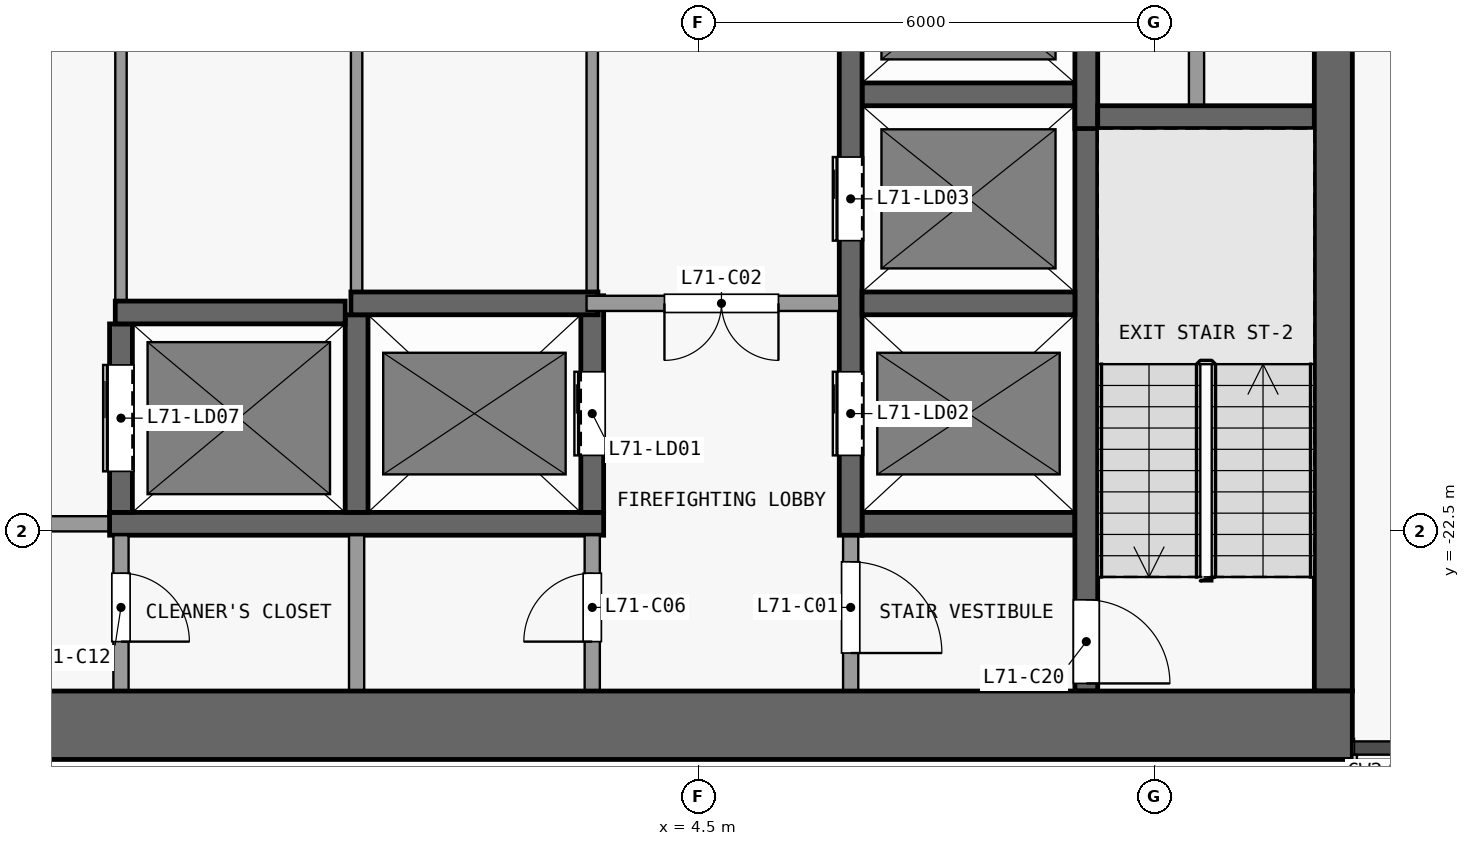
"""IFC4 building model, lengths in metres.
Left out: names, types, materials, properties, quantities, classifications, styles, units other than length and angle.
Written with IfcOpenShell. Run it as: python <this file> out.ifc"""

import sys

from ifc_helpers import new_model, si_unit, direction, frame, frame_2d, origin, place, context, subcontext, project, spatial, rectangle, extrude, element, fill, save


model = new_model("IFC4")
c1 = context("Model", 3, precision=1e-05, world=origin(), true_north=direction((0.0, 1.0)))
c2 = subcontext(c1, "Body", "Model", "MODEL_VIEW")
j1 = project(units=[si_unit("LENGTHUNIT", "METRE"), si_unit("PLANEANGLEUNIT", "RADIAN")], contexts=[c1])
p1 = place(None, origin())
s1 = spatial("IfcSite", under=j1, at=p1, CompositionType="ELEMENT")
p2 = place(p1, origin())
s2 = spatial("IfcBuilding", under=s1, at=p2, CompositionType="ELEMENT")
p3 = place(p2, frame((0.0, 0.0, 280.7)))
s3 = spatial("IfcBuildingStorey", under=s2, at=p3, CompositionType="ELEMENT", Elevation=280.7)
p4 = place(p3, frame((-13.1, -25.05, 0.0), z_axis=(0.0, 0.0, 1.0), x_axis=(1.0, 0.0, 0.0)))
e1 = element("IfcWall", 1, at=p4, inside=s3, PredefinedType="SHEAR", context=c2, shape_type="SweptSolid", body=[
    extrude(rectangle(XDim=26.2, YDim=0.9, at=frame_2d((13.1, 0.0))), origin(), (0.0, 0.0, 1.0), 3.3),
])
p5 = place(p3, frame((12.85, -24.6, 0.0), z_axis=(0.0, 0.0, 1.0), x_axis=(0.0, 1.0, 0.0)))
e2 = element("IfcWall", 2, at=p5, inside=s3, PredefinedType="SHEAR", context=c2, shape_type="SweptSolid", body=[
    extrude(rectangle(XDim=16.1, YDim=0.5, at=frame_2d((8.05, 0.0))), origin(), (0.0, 0.0, 1.0), 3.3),
])
p6 = place(p3, frame((-3.25, -22.4, 0.0), z_axis=(0.0, 0.0, 1.0), x_axis=(-1.0, 0.0, 0.0)))
e3 = element("IfcWall", 3, at=p6, inside=s3, PredefinedType="PARTITIONING", context=c2, shape_type="SweptSolid", body=[
    extrude(rectangle(XDim=6.2, YDim=0.2, at=frame_2d((3.1, 0.0))), origin(), (0.0, 0.0, 1.0), 3.3),
])
p7 = place(p6, frame((0.8, 0.0, 0.0)))
e4 = element("IfcOpeningElement", 4, at=p7, cuts=e3, PredefinedType="OPENING", context=c2, shape_type="SweptSolid", body=[
    extrude(rectangle(XDim=1.5, YDim=2.1, at=frame_2d((0.75, 1.05))), frame((0.0, 0.11, 0.0), z_axis=(0.0, -1.0, 0.0), x_axis=(1.0, 0.0, 0.0)), (0.0, 0.0, 1.0), 0.22),
])
p8 = place(p3, frame((-3.25, -22.4, 0.0), z_axis=(0.0, 0.0, 1.0), x_axis=(1.0, 0.0, 0.0)))
e5 = element("IfcWall", 5, at=p8, inside=s3, PredefinedType="SHEAR", context=c2, shape_type="SweptSolid", body=[
    extrude(rectangle(XDim=6.5, YDim=0.3, at=frame_2d((3.25, 0.0))), origin(), (0.0, 0.0, 1.0), 3.3),
])
p9 = place(p3, frame((6.65, -22.4, 0.0), z_axis=(0.0, 0.0, 1.0), x_axis=(1.0, 0.0, 0.0)))
e6 = element("IfcWall", 6, at=p9, inside=s3, PredefinedType="SHEAR", context=c2, shape_type="SweptSolid", body=[
    extrude(rectangle(XDim=2.8, YDim=0.3, at=frame_2d((1.4, 0.0))), origin(), (0.0, 0.0, 1.0), 3.3),
])
p10 = place(p3, frame((-3.175, -19.62, 0.0), z_axis=(0.0, 0.0, 1.0), x_axis=(1.0, 0.0, 0.0)))
e7 = element("IfcWall", 7, at=p10, inside=s3, PredefinedType="SHEAR", context=c2, shape_type="SweptSolid", body=[
    extrude(rectangle(XDim=3.025, YDim=0.3, at=frame_2d((1.513, 0.0))), origin(), (0.0, 0.0, 1.0), 3.3),
])
p11 = place(p3, frame((-0.075, -19.5, 0.0), z_axis=(0.0, 0.0, 1.0), x_axis=(1.0, 0.0, 0.0)))
e8 = element("IfcWall", 8, at=p11, inside=s3, PredefinedType="SHEAR", context=c2, shape_type="SweptSolid", body=[
    extrude(rectangle(XDim=3.25, YDim=0.3, at=frame_2d((1.625, 0.0))), origin(), (0.0, 0.0, 1.0), 3.3),
])
p12 = place(p3, frame((6.35, -19.5, 0.0), z_axis=(0.0, 0.0, 1.0), x_axis=(-1.0, 0.0, 0.0)))
e9 = element("IfcWall", 9, at=p12, inside=s3, PredefinedType="PARTITIONING", context=c2, shape_type="SweptSolid", body=[
    extrude(rectangle(XDim=3.325, YDim=0.2, at=frame_2d((1.663, 0.0))), origin(), (0.0, 0.0, 1.0), 3.3),
])
p13 = place(p12, frame((0.8, 0.0, 0.0)))
e10 = element("IfcOpeningElement", 10, at=p13, cuts=e9, PredefinedType="OPENING", context=c2, shape_type="SweptSolid", body=[
    extrude(rectangle(XDim=1.5, YDim=2.1, at=frame_2d((0.75, 1.05))), frame((0.0, 0.11, 0.0), z_axis=(0.0, -1.0, 0.0), x_axis=(1.0, 0.0, 0.0)), (0.0, 0.0, 1.0), 0.22),
])
p14 = place(p3, frame((6.65, -19.5, 0.0), z_axis=(0.0, 0.0, 1.0), x_axis=(1.0, 0.0, 0.0)))
e11 = element("IfcWall", 11, at=p14, inside=s3, PredefinedType="SHEAR", context=c2, shape_type="SweptSolid", body=[
    extrude(rectangle(XDim=2.8, YDim=0.3, at=frame_2d((1.4, 0.0))), origin(), (0.0, 0.0, 1.0), 3.3),
])
p15 = place(p3, frame((9.75, -17.05, 0.0), z_axis=(0.0, 0.0, 1.0), x_axis=(1.0, 0.0, 0.0)))
e12 = element("IfcWall", 12, at=p15, inside=s3, PredefinedType="SHEAR", context=c2, shape_type="SweptSolid", body=[
    extrude(rectangle(XDim=2.85, YDim=0.3, at=frame_2d((1.425, 0.0))), origin(), (0.0, 0.0, 1.0), 3.3),
])
p16 = place(p3, frame((6.65, -16.75, 0.0), z_axis=(0.0, 0.0, 1.0), x_axis=(1.0, 0.0, 0.0)))
e13 = element("IfcWall", 13, at=p16, inside=s3, PredefinedType="SHEAR", context=c2, shape_type="SweptSolid", body=[
    extrude(rectangle(XDim=2.8, YDim=0.3, at=frame_2d((1.4, 0.0))), origin(), (0.0, 0.0, 1.0), 3.3),
])
p17 = place(p3, frame((-3.1, -22.55, 0.0), z_axis=(0.0, 0.0, 1.0), x_axis=(0.0, -1.0, 0.0)))
e14 = element("IfcWall", 14, at=p17, inside=s3, PredefinedType="PARTITIONING", context=c2, shape_type="SweptSolid", body=[
    extrude(rectangle(XDim=2.05, YDim=0.2, at=frame_2d((1.025, 0.0))), origin(), (0.0, 0.0, 1.0), 3.3),
])
p18 = place(p17, frame((0.5, 0.0, 0.0)))
e15 = element("IfcOpeningElement", 15, at=p18, cuts=e14, PredefinedType="OPENING", context=c2, shape_type="SweptSolid", body=[
    extrude(rectangle(XDim=0.9, YDim=2.1, at=frame_2d((0.45, 1.05))), frame((0.0, 0.11, 0.0), z_axis=(0.0, -1.0, 0.0), x_axis=(1.0, 0.0, 0.0)), (0.0, 0.0, 1.0), 0.22),
])
p19 = place(p3, frame((-3.1, -22.25, 0.0), z_axis=(0.0, 0.0, 1.0), x_axis=(0.0, 1.0, 0.0)))
e16 = element("IfcWall", 16, at=p19, inside=s3, PredefinedType="SHEAR", context=c2, shape_type="SweptSolid", body=[
    extrude(rectangle(XDim=2.48, YDim=0.3, at=frame_2d((1.24, 0.0))), origin(), (0.0, 0.0, 1.0), 3.3),
])
p20 = place(p19, frame((0.54, 0.0, 0.0)))
e17 = element("IfcOpeningElement", 17, at=p20, cuts=e16, PredefinedType="OPENING", context=c2, shape_type="SweptSolid", body=[
    extrude(rectangle(XDim=1.4, YDim=2.1, at=frame_2d((0.7, 1.05))), frame((0.0, 0.16, 0.0), z_axis=(0.0, -1.0, 0.0), x_axis=(1.0, 0.0, 0.0)), (0.0, 0.0, 1.0), 0.32),
])
p21 = place(p3, frame((-3.1, -8.5, 0.0), z_axis=(0.0, 0.0, 1.0), x_axis=(0.0, -1.0, 0.0)))
e18 = element("IfcWall", 18, at=p21, inside=s3, PredefinedType="PARTITIONING", context=c2, shape_type="SweptSolid", body=[
    extrude(rectangle(XDim=10.97, YDim=0.15, at=frame_2d((5.485, 0.0))), origin(), (0.0, 0.0, 1.0), 3.3),
])
p22 = place(p21, frame((4.96, 0.0, 0.0)))
e19 = element("IfcOpeningElement", 19, at=p22, cuts=e18, PredefinedType="OPENING", context=c2, shape_type="SweptSolid", body=[
    extrude(rectangle(XDim=1.2, YDim=2.1, at=frame_2d((0.6, 1.05))), frame((0.0, 0.085, 0.0), z_axis=(0.0, -1.0, 0.0), x_axis=(1.0, 0.0, 0.0)), (0.0, 0.0, 1.0), 0.17),
])
p23 = place(p3, frame((0.0, -24.6, 0.0), z_axis=(0.0, 0.0, 1.0), x_axis=(0.0, 1.0, 0.0)))
e20 = element("IfcWall", 20, at=p23, inside=s3, PredefinedType="PARTITIONING", context=c2, shape_type="SweptSolid", body=[
    extrude(rectangle(XDim=2.05, YDim=0.2, at=frame_2d((1.025, 0.0))), origin(), (0.0, 0.0, 1.0), 3.3),
])
p24 = place(p3, frame((0.0, -22.25, 0.0), z_axis=(0.0, 0.0, 1.0), x_axis=(0.0, 1.0, 0.0)))
e21 = element("IfcWall", 21, at=p24, inside=s3, PredefinedType="SHEAR", context=c2, shape_type="SweptSolid", body=[
    extrude(rectangle(XDim=2.6, YDim=0.3, at=frame_2d((1.3, 0.0))), origin(), (0.0, 0.0, 1.0), 3.3),
])
p25 = place(p3, frame((0.0, -19.35, 0.0), z_axis=(0.0, 0.0, 1.0), x_axis=(0.0, 1.0, 0.0)))
e22 = element("IfcWall", 22, at=p25, inside=s3, PredefinedType="PARTITIONING", context=c2, shape_type="SweptSolid", body=[
    extrude(rectangle(XDim=10.85, YDim=0.15, at=frame_2d((5.425, 0.0))), origin(), (0.0, 0.0, 1.0), 3.3),
])
p26 = place(p3, frame((3.1, -24.6, 0.0), z_axis=(0.0, 0.0, 1.0), x_axis=(0.0, 1.0, 0.0)))
e23 = element("IfcWall", 23, at=p26, inside=s3, PredefinedType="PARTITIONING", context=c2, shape_type="SweptSolid", body=[
    extrude(rectangle(XDim=2.05, YDim=0.2, at=frame_2d((1.025, 0.0))), origin(), (0.0, 0.0, 1.0), 3.3),
])
p27 = place(p26, frame((0.65, 0.0, 0.0)))
e24 = element("IfcOpeningElement", 24, at=p27, cuts=e23, PredefinedType="OPENING", context=c2, shape_type="SweptSolid", body=[
    extrude(rectangle(XDim=0.9, YDim=2.1, at=frame_2d((0.45, 1.05))), frame((0.0, 0.11, 0.0), z_axis=(0.0, -1.0, 0.0), x_axis=(1.0, 0.0, 0.0)), (0.0, 0.0, 1.0), 0.22),
])
p28 = place(p3, frame((3.1, -22.25, 0.0), z_axis=(0.0, 0.0, 1.0), x_axis=(0.0, 1.0, 0.0)))
e25 = element("IfcWall", 25, at=p28, inside=s3, PredefinedType="SHEAR", context=c2, shape_type="SweptSolid", body=[
    extrude(rectangle(XDim=2.85, YDim=0.3, at=frame_2d((1.425, 0.0))), origin(), (0.0, 0.0, 1.0), 3.3),
])
p29 = place(p28, frame((0.75, 0.0, 0.0)))
e26 = element("IfcOpeningElement", 26, at=p29, cuts=e25, PredefinedType="OPENING", context=c2, shape_type="SweptSolid", body=[
    extrude(rectangle(XDim=1.1, YDim=2.1, at=frame_2d((0.55, 1.05))), frame((0.0, 0.16, 0.0), z_axis=(0.0, -1.0, 0.0), x_axis=(1.0, 0.0, 0.0)), (0.0, 0.0, 1.0), 0.32),
])
p30 = place(p3, frame((3.1, -19.4, 0.0), z_axis=(0.0, 0.0, 1.0), x_axis=(0.0, 1.0, 0.0)))
e27 = element("IfcWall", 27, at=p30, inside=s3, PredefinedType="PARTITIONING", context=c2, shape_type="SweptSolid", body=[
    extrude(rectangle(XDim=10.9, YDim=0.15, at=frame_2d((5.45, 0.0))), origin(), (0.0, 0.0, 1.0), 3.3),
])
p31 = place(p30, frame((4.8, 0.0, 0.0)))
e28 = element("IfcOpeningElement", 28, at=p31, cuts=e27, PredefinedType="OPENING", context=c2, shape_type="SweptSolid", body=[
    extrude(rectangle(XDim=1.2, YDim=2.1, at=frame_2d((0.6, 1.05))), frame((0.0, 0.085, 0.0), z_axis=(0.0, -1.0, 0.0), x_axis=(1.0, 0.0, 0.0)), (0.0, 0.0, 1.0), 0.17),
])
p32 = place(p3, frame((6.5, -22.55, 0.0), z_axis=(0.0, 0.0, 1.0), x_axis=(0.0, -1.0, 0.0)))
e29 = element("IfcWall", 29, at=p32, inside=s3, PredefinedType="PARTITIONING", context=c2, shape_type="SweptSolid", body=[
    extrude(rectangle(XDim=2.05, YDim=0.2, at=frame_2d((1.025, 0.0))), origin(), (0.0, 0.0, 1.0), 3.3),
])
p33 = place(p32, frame((0.35, 0.0, 0.0)))
e30 = element("IfcOpeningElement", 30, at=p33, cuts=e29, PredefinedType="OPENING", context=c2, shape_type="SweptSolid", body=[
    extrude(rectangle(XDim=1.2, YDim=2.1, at=frame_2d((0.6, 1.05))), frame((0.0, 0.11, 0.0), z_axis=(0.0, -1.0, 0.0), x_axis=(1.0, 0.0, 0.0)), (0.0, 0.0, 1.0), 0.22),
])
p34 = place(p3, frame((6.5, -22.55, 0.0), z_axis=(0.0, 0.0, 1.0), x_axis=(0.0, 1.0, 0.0)))
e31 = element("IfcWall", 31, at=p34, inside=s3, PredefinedType="SHEAR", context=c2, shape_type="SweptSolid", body=[
    extrude(rectangle(XDim=14.05, YDim=0.3, at=frame_2d((7.025, 0.0))), origin(), (0.0, 0.0, 1.0), 3.3),
])
p35 = place(p34, frame((1.05, 0.0, 0.0)))
e32 = element("IfcOpeningElement", 32, at=p35, cuts=e31, PredefinedType="OPENING", context=c2, shape_type="SweptSolid", body=[
    extrude(rectangle(XDim=1.1, YDim=2.1, at=frame_2d((0.55, 1.05))), frame((0.0, 0.16, 0.0), z_axis=(0.0, -1.0, 0.0), x_axis=(1.0, 0.0, 0.0)), (0.0, 0.0, 1.0), 0.32),
])
p36 = place(p34, frame((3.875, 0.0, 0.0)))
e33 = element("IfcOpeningElement", 33, at=p36, cuts=e31, PredefinedType="OPENING", context=c2, shape_type="SweptSolid", body=[
    extrude(rectangle(XDim=1.1, YDim=2.1, at=frame_2d((0.55, 1.05))), frame((0.0, 0.16, 0.0), z_axis=(0.0, -1.0, 0.0), x_axis=(1.0, 0.0, 0.0)), (0.0, 0.0, 1.0), 0.32),
])
p37 = place(p34, frame((6.625, 0.0, 0.0)))
e34 = element("IfcOpeningElement", 34, at=p37, cuts=e31, PredefinedType="OPENING", context=c2, shape_type="SweptSolid", body=[
    extrude(rectangle(XDim=1.1, YDim=2.1, at=frame_2d((0.55, 1.05))), frame((0.0, 0.16, 0.0), z_axis=(0.0, -1.0, 0.0), x_axis=(1.0, 0.0, 0.0)), (0.0, 0.0, 1.0), 0.32),
])
p38 = place(p34, frame((9.375, 0.0, 0.0)))
e35 = element("IfcOpeningElement", 35, at=p38, cuts=e31, PredefinedType="OPENING", context=c2, shape_type="SweptSolid", body=[
    extrude(rectangle(XDim=1.1, YDim=2.1, at=frame_2d((0.55, 1.05))), frame((0.0, 0.16, 0.0), z_axis=(0.0, -1.0, 0.0), x_axis=(1.0, 0.0, 0.0)), (0.0, 0.0, 1.0), 0.32),
])
p39 = place(p34, frame((12.125, 0.0, 0.0)))
e36 = element("IfcOpeningElement", 36, at=p39, cuts=e31, PredefinedType="OPENING", context=c2, shape_type="SweptSolid", body=[
    extrude(rectangle(XDim=1.1, YDim=2.1, at=frame_2d((0.55, 1.05))), frame((0.0, 0.16, 0.0), z_axis=(0.0, -1.0, 0.0), x_axis=(1.0, 0.0, 0.0)), (0.0, 0.0, 1.0), 0.32),
])
p40 = place(p3, frame((9.6, -16.9, 0.0), z_axis=(0.0, 0.0, 1.0), x_axis=(0.0, -1.0, 0.0)))
e37 = element("IfcWall", 37, at=p40, inside=s3, PredefinedType="SHEAR", context=c2, shape_type="SweptSolid", body=[
    extrude(rectangle(XDim=7.7, YDim=0.3, at=frame_2d((3.85, 0.0))), origin(), (0.0, 0.0, 1.0), 3.3),
])
p41 = place(p40, frame((6.5, 0.0, 0.0)))
e38 = element("IfcOpeningElement", 38, at=p41, cuts=e37, PredefinedType="OPENING", context=c2, shape_type="SweptSolid", body=[
    extrude(rectangle(XDim=1.1, YDim=2.1, at=frame_2d((0.55, 1.05))), frame((0.0, 0.16, 0.0), z_axis=(0.0, -1.0, 0.0), x_axis=(1.0, 0.0, 0.0)), (0.0, 0.0, 1.0), 0.32),
])
p42 = place(p3, frame((9.6, -17.2, 0.0), z_axis=(0.0, 0.0, 1.0), x_axis=(0.0, 1.0, 0.0)))
e39 = element("IfcWall", 39, at=p42, inside=s3, PredefinedType="SHEAR", context=c2, shape_type="SweptSolid", body=[
    extrude(rectangle(XDim=8.7, YDim=0.3, at=frame_2d((4.35, 0.0))), origin(), (0.0, 0.0, 1.0), 3.3),
])
p43 = place(p3, frame((11.05, -11.2, 0.0), z_axis=(0.0, 0.0, 1.0), x_axis=(0.0, -1.0, 0.0)))
e40 = element("IfcWall", 40, at=p43, inside=s3, PredefinedType="PARTITIONING", context=c2, shape_type="SweptSolid", body=[
    extrude(rectangle(XDim=5.7, YDim=0.2, at=frame_2d((2.85, 0.0))), origin(), (0.0, 0.0, 1.0), 3.3),
])
p44 = place(p43, frame((2.525, 0.0, 0.0)))
e41 = element("IfcOpeningElement", 41, at=p44, cuts=e40, PredefinedType="OPENING", context=c2, shape_type="SweptSolid", body=[
    extrude(rectangle(XDim=0.9, YDim=2.1, at=frame_2d((0.45, 1.05))), frame((0.0, 0.11, 0.0), z_axis=(0.0, -1.0, 0.0), x_axis=(1.0, 0.0, 0.0)), (0.0, 0.0, 1.0), 0.22),
])
p45 = place(p29, origin())
e42 = element("IfcDoor", 42, at=p45, inside=s3, OperationType="DOUBLE_DOOR_SLIDING", PredefinedType="DOOR", context=c2, shape_type="SweptSolid", body=[
    extrude(rectangle(XDim=1.1, YDim=2.1, at=frame_2d((0.55, 1.05))), frame((0.0, 0.025, 0.0), z_axis=(0.0, -1.0, 0.0), x_axis=(1.0, 0.0, 0.0)), (0.0, 0.0, 1.0), 0.05),
])
fill(e26, e42)
p46 = place(p35, origin())
e43 = element("IfcDoor", 43, at=p46, inside=s3, OperationType="DOUBLE_DOOR_SLIDING", PredefinedType="DOOR", context=c2, shape_type="SweptSolid", body=[
    extrude(rectangle(XDim=1.1, YDim=2.1, at=frame_2d((0.55, 1.05))), frame((0.0, 0.025, 0.0), z_axis=(0.0, -1.0, 0.0), x_axis=(1.0, 0.0, 0.0)), (0.0, 0.0, 1.0), 0.05),
])
fill(e32, e43)
p47 = place(p36, origin())
e44 = element("IfcDoor", 44, at=p47, inside=s3, OperationType="DOUBLE_DOOR_SLIDING", PredefinedType="DOOR", context=c2, shape_type="SweptSolid", body=[
    extrude(rectangle(XDim=1.1, YDim=2.1, at=frame_2d((0.55, 1.05))), frame((0.0, 0.025, 0.0), z_axis=(0.0, -1.0, 0.0), x_axis=(1.0, 0.0, 0.0)), (0.0, 0.0, 1.0), 0.05),
])
fill(e33, e44)
p48 = place(p20, origin())
e45 = element("IfcDoor", 45, at=p48, inside=s3, OperationType="DOUBLE_DOOR_SLIDING", PredefinedType="DOOR", context=c2, shape_type="SweptSolid", body=[
    extrude(rectangle(XDim=1.4, YDim=2.1, at=frame_2d((0.7, 1.05))), frame((0.0, 0.025, 0.0), z_axis=(0.0, -1.0, 0.0), x_axis=(1.0, 0.0, 0.0)), (0.0, 0.0, 1.0), 0.05),
])
fill(e17, e45)
p49 = place(p33, origin())
e46 = element("IfcDoor", 46, at=p49, inside=s3, OperationType="SINGLE_SWING_RIGHT", PredefinedType="DOOR", context=c2, shape_type="SweptSolid", body=[
    extrude(rectangle(XDim=1.2, YDim=2.1, at=frame_2d((0.6, 1.05))), frame((0.0, 0.025, 0.0), z_axis=(0.0, -1.0, 0.0), x_axis=(1.0, 0.0, 0.0)), (0.0, 0.0, 1.0), 0.05),
])
fill(e30, e46)
p50 = place(p13, origin())
e47 = element("IfcDoor", 47, at=p50, inside=s3, OperationType="DOUBLE_DOOR_SINGLE_SWING", PredefinedType="DOOR", context=c2, shape_type="SweptSolid", body=[
    extrude(rectangle(XDim=1.5, YDim=2.1, at=frame_2d((0.75, 1.05))), frame((0.0, 0.025, 0.0), z_axis=(0.0, -1.0, 0.0), x_axis=(1.0, 0.0, 0.0)), (0.0, 0.0, 1.0), 0.05),
])
fill(e10, e47)
p51 = place(p27, origin())
e48 = element("IfcDoor", 48, at=p51, inside=s3, OperationType="SINGLE_SWING_LEFT", PredefinedType="DOOR", context=c2, shape_type="SweptSolid", body=[
    extrude(rectangle(XDim=0.9, YDim=2.1, at=frame_2d((0.45, 1.05))), frame((0.0, 0.025, 0.0), z_axis=(0.0, -1.0, 0.0), x_axis=(1.0, 0.0, 0.0)), (0.0, 0.0, 1.0), 0.05),
])
fill(e24, e48)
p52 = place(p18, origin())
e49 = element("IfcDoor", 49, at=p52, inside=s3, OperationType="SINGLE_SWING_RIGHT", PredefinedType="DOOR", context=c2, shape_type="SweptSolid", body=[
    extrude(rectangle(XDim=0.9, YDim=2.1, at=frame_2d((0.45, 1.05))), frame((0.0, 0.025, 0.0), z_axis=(0.0, -1.0, 0.0), x_axis=(1.0, 0.0, 0.0)), (0.0, 0.0, 1.0), 0.05),
])
fill(e15, e49)
p53 = place(p41, origin())
e50 = element("IfcDoor", 50, at=p53, inside=s3, OperationType="SINGLE_SWING_RIGHT", PredefinedType="DOOR", context=c2, shape_type="SweptSolid", body=[
    extrude(rectangle(XDim=1.1, YDim=2.1, at=frame_2d((0.55, 1.05))), frame((0.0, 0.025, 0.0), z_axis=(0.0, -1.0, 0.0), x_axis=(1.0, 0.0, 0.0)), (0.0, 0.0, 1.0), 0.05),
])
fill(e38, e50)
save(model, sys.argv[1])
